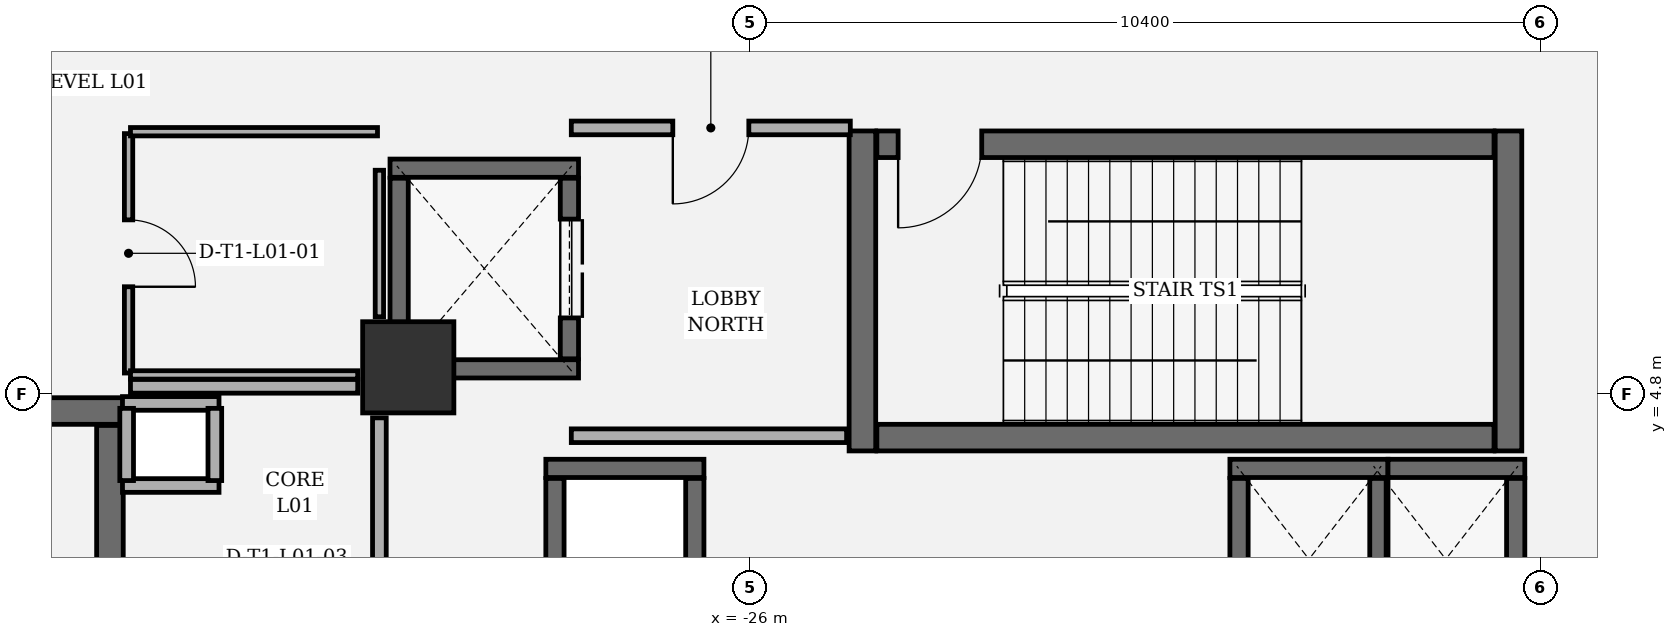
"""IFC4 building model, lengths in metres.
Left out: names, types, materials, properties, quantities, classifications, styles, units other than length and angle.
Written with IfcOpenShell. Run it as: python <this file> out.ifc"""

import sys

from ifc_helpers import new_model, si_unit, direction, frame, frame_2d, origin, origin_2d, place, context, subcontext, project, spatial, rectangle, extrude, element, fill, save


model = new_model("IFC4")
c1 = context("Model", 3, precision=1e-05, world=origin(), true_north=direction((0.0, 1.0)))
c2 = subcontext(c1, "Body", "Model", "MODEL_VIEW")
j1 = project(units=[si_unit("LENGTHUNIT", "METRE"), si_unit("PLANEANGLEUNIT", "RADIAN")], contexts=[c1])
p1 = place(None, origin())
s1 = spatial("IfcSite", under=j1, at=p1, CompositionType="ELEMENT")
p2 = place(p1, origin())
s2 = spatial("IfcBuilding", under=s1, at=p2, CompositionType="ELEMENT")
p3 = place(p2, frame((0.0, 0.0, 6.6)))
s3 = spatial("IfcBuildingStorey", under=s2, at=p3, CompositionType="ELEMENT", Elevation=6.6)
p4 = place(p3, frame((-30.5, 5.15, 0.0), z_axis=(0.0, 0.0, 1.0), x_axis=(1.0, 0.0, 0.0)))
e1 = element("IfcColumn", 1, at=p4, inside=s3, PredefinedType="COLUMN", context=c2, shape_type="SweptSolid", body=[
    extrude(rectangle(XDim=1.2, YDim=1.2, at=origin_2d()), origin(), (0.0, 0.0, 1.0), 5.4),
])
p5 = place(p3, frame((-64.419, 4.637, 0.0), z_axis=(0.0, 0.0, 1.0), x_axis=(0.842602364841, 0.538536214905, 0.0)))
e2 = element("IfcWall", 2, at=p5, inside=s3, PredefinedType="SOLIDWALL", context=c2, shape_type="SweptSolid", body=[
    extrude(rectangle(XDim=60.27, YDim=0.38, at=frame_2d((30.135, 0.0))), origin(), (0.0, 0.0, 1.0), 5.14),
])
p6 = place(p5, frame((29.435, 0.0, 0.8)))
e3 = element("IfcOpeningElement", 3, at=p6, cuts=e2, PredefinedType="OPENING", context=c2, shape_type="SweptSolid", body=[
    extrude(rectangle(XDim=1.4, YDim=1.5, at=frame_2d((0.7, 0.75))), frame((0.0, 0.2, 0.0), z_axis=(0.0, -1.0, 0.0), x_axis=(1.0, 0.0, 0.0)), (0.0, 0.0, 1.0), 0.4),
])
for number, where, z_axis, x_axis in (
    (4, (-24.525, 8.26, 0.0), (0.0, 0.0, 1.0), (0.0, -1.0, 0.0)),
    (5, (-16.025, 4.05, 0.0), (0.0, 0.0, 1.0), (0.0, 1.0, 0.0)),
):
    element("IfcWall", number, at=place(p3, frame(where, z_axis=z_axis, x_axis=x_axis)), inside=s3, PredefinedType="SHEAR", context=c2, shape_type="SweptSolid", body=[
        extrude(rectangle(XDim=4.21, YDim=0.35, at=frame_2d((2.105, 0.0))), origin(), (0.0, 0.0, 1.0), 5.14),
    ])
p7 = place(p3, frame((-24.335, 4.225, 0.0), z_axis=(0.0, 0.0, 1.0), x_axis=(1.0, 0.0, 0.0)))
e6 = element("IfcWall", 6, at=p7, inside=s3, PredefinedType="SHEAR", context=c2, shape_type="SweptSolid", body=[
    extrude(rectangle(XDim=8.12, YDim=0.35, at=frame_2d((4.06, 0.0))), origin(), (0.0, 0.0, 1.0), 5.14),
])
p8 = place(p3, frame((-16.215, 8.085, 0.0), z_axis=(0.0, 0.0, 1.0), x_axis=(-1.0, 0.0, 0.0)))
e7 = element("IfcWall", 7, at=p8, inside=s3, PredefinedType="SHEAR", context=c2, shape_type="SweptSolid", body=[
    extrude(rectangle(XDim=8.12, YDim=0.35, at=frame_2d((4.06, 0.0))), origin(), (0.0, 0.0, 1.0), 5.14),
])
p9 = place(p8, frame((6.74, 0.0, 0.0)))
e8 = element("IfcOpeningElement", 8, at=p9, cuts=e7, PredefinedType="OPENING", context=c2, shape_type="SweptSolid", body=[
    extrude(rectangle(XDim=1.1, YDim=2.2, at=frame_2d((0.55, 1.1))), frame((0.0, 0.185, 0.0), z_axis=(0.0, -1.0, 0.0), x_axis=(1.0, 0.0, 0.0)), (0.0, 0.0, 1.0), 0.37),
])
p10 = place(p3, frame((-34.25, 4.575, 0.0), z_axis=(0.0, 0.0, 1.0), x_axis=(-1.0, 0.0, 0.0)))
e9 = element("IfcWall", 9, at=p10, inside=s3, PredefinedType="SHEAR", context=c2, shape_type="SweptSolid", body=[
    extrude(rectangle(XDim=4.21, YDim=0.35, at=frame_2d((2.105, 0.0))), origin(), (0.0, 0.0, 1.0), 5.14),
])
p11 = place(p3, frame((-34.425, -4.385, 0.0), z_axis=(0.0, 0.0, 1.0), x_axis=(0.0, 1.0, 0.0)))
e10 = element("IfcWall", 10, at=p11, inside=s3, PredefinedType="SHEAR", context=c2, shape_type="SweptSolid", body=[
    extrude(rectangle(XDim=8.77, YDim=0.35, at=frame_2d((4.385, 0.0))), origin(), (0.0, 0.0, 1.0), 5.14),
])
for number, where, z_axis, x_axis in (
    (11, (-28.26, 5.13, 0.0), (0.0, 0.0, 1.0), (-1.0, 0.0, 0.0)),
    (12, (-30.74, 7.77, 0.0), (0.0, 0.0, 1.0), (1.0, 0.0, 0.0)),
):
    element("IfcWall", number, at=place(p3, frame(where, z_axis=z_axis, x_axis=x_axis)), inside=s3, PredefinedType="SHEAR", context=c2, shape_type="SweptSolid", body=[
        extrude(rectangle(XDim=2.48, YDim=0.24, at=frame_2d((1.24, 0.0))), origin(), (0.0, 0.0, 1.0), 5.14),
    ])
p12 = place(p3, frame((-30.62, 5.262, 0.0), z_axis=(0.0, 0.0, 1.0), x_axis=(0.0, 1.0, 0.0)))
e13 = element("IfcWall", 13, at=p12, inside=s3, PredefinedType="SHEAR", context=c2, shape_type="SweptSolid", body=[
    extrude(rectangle(XDim=2.376, YDim=0.24, at=frame_2d((1.188, 0.0))), origin(), (0.0, 0.0, 1.0), 5.14),
])
p13 = place(p3, frame((-28.38, 7.638, 0.0), z_axis=(0.0, 0.0, 1.0), x_axis=(0.0, -1.0, 0.0)))
e14 = element("IfcWall", 14, at=p13, inside=s3, PredefinedType="SHEAR", context=c2, shape_type="SweptSolid", body=[
    extrude(rectangle(XDim=2.376, YDim=0.24, at=frame_2d((1.188, 0.0))), origin(), (0.0, 0.0, 1.0), 5.14),
])
p14 = place(p13, frame((0.538, 0.0, 0.0)))
e15 = element("IfcOpeningElement", 15, at=p14, cuts=e14, PredefinedType="OPENING", context=c2, shape_type="SweptSolid", body=[
    extrude(rectangle(XDim=1.3, YDim=2.3, at=frame_2d((0.65, 1.15))), frame((0.0, 0.13, 0.0), z_axis=(0.0, -1.0, 0.0), x_axis=(1.0, 0.0, 0.0)), (0.0, 0.0, 1.0), 0.26),
])
p15 = place(p3, frame((-28.69, 3.82, 0.0), z_axis=(0.0, 0.0, 1.0), x_axis=(1.0, 0.0, 0.0)))
e16 = element("IfcWall", 16, at=p15, inside=s3, PredefinedType="SHEAR", context=c2, shape_type="SweptSolid", body=[
    extrude(rectangle(XDim=2.08, YDim=0.24, at=frame_2d((1.04, 0.0))), origin(), (0.0, 0.0, 1.0), 5.14),
])
for number, where, z_axis, x_axis in (
    (17, (-28.57, 1.562, 0.0), (0.0, 0.0, 1.0), (0.0, 1.0, 0.0)),
    (18, (-26.73, 3.688, 0.0), (0.0, 0.0, 1.0), (0.0, -1.0, 0.0)),
):
    element("IfcWall", number, at=place(p3, frame(where, z_axis=z_axis, x_axis=x_axis)), inside=s3, PredefinedType="SHEAR", context=c2, shape_type="SweptSolid", body=[
        extrude(rectangle(XDim=2.126, YDim=0.24, at=frame_2d((1.063, 0.0))), origin(), (0.0, 0.0, 1.0), 5.14),
    ])
p16 = place(p3, frame((-19.69, 3.82, 0.0), z_axis=(0.0, 0.0, 1.0), x_axis=(1.0, 0.0, 0.0)))
e19 = element("IfcWall", 19, at=p16, inside=s3, PredefinedType="SHEAR", context=c2, shape_type="SweptSolid", body=[
    extrude(rectangle(XDim=2.08, YDim=0.24, at=frame_2d((1.04, 0.0))), origin(), (0.0, 0.0, 1.0), 5.14),
])
for number, where, z_axis, x_axis in (
    (20, (-19.57, 1.562, 0.0), (0.0, 0.0, 1.0), (0.0, 1.0, 0.0)),
    (21, (-17.73, 3.688, 0.0), (0.0, 0.0, 1.0), (0.0, -1.0, 0.0)),
):
    element("IfcWall", number, at=place(p3, frame(where, z_axis=z_axis, x_axis=x_axis)), inside=s3, PredefinedType="SHEAR", context=c2, shape_type="SweptSolid", body=[
        extrude(rectangle(XDim=2.126, YDim=0.24, at=frame_2d((1.063, 0.0))), origin(), (0.0, 0.0, 1.0), 5.14),
    ])
p17 = place(p3, frame((-17.61, 3.82, 0.0), z_axis=(0.0, 0.0, 1.0), x_axis=(1.0, 0.0, 0.0)))
e22 = element("IfcWall", 22, at=p17, inside=s3, PredefinedType="SHEAR", context=c2, shape_type="SweptSolid", body=[
    extrude(rectangle(XDim=1.8, YDim=0.24, at=frame_2d((0.9, 0.0))), origin(), (0.0, 0.0, 1.0), 5.14),
])
p18 = place(p3, frame((-15.93, 3.688, 0.0), z_axis=(0.0, 0.0, 1.0), x_axis=(0.0, -1.0, 0.0)))
e23 = element("IfcWall", 23, at=p18, inside=s3, PredefinedType="SHEAR", context=c2, shape_type="SweptSolid", body=[
    extrude(rectangle(XDim=2.126, YDim=0.24, at=frame_2d((1.063, 0.0))), origin(), (0.0, 0.0, 1.0), 5.14),
])
for number, where, z_axis, x_axis in (
    (24, (-32.99, 3.595, 0.0), (0.0, 0.0, 1.0), (-1.0, 0.0, 0.0)),
    (25, (-34.26, 4.675, 0.0), (0.0, 0.0, 1.0), (1.0, 0.0, 0.0)),
):
    element("IfcWall", number, at=place(p3, frame(where, z_axis=z_axis, x_axis=x_axis)), inside=s3, PredefinedType="PARTITIONING", context=c2, shape_type="SweptSolid", body=[
        extrude(rectangle(XDim=1.27, YDim=0.18, at=frame_2d((0.635, 0.0))), origin(), (0.0, 0.0, 1.0), 5.14),
    ])
for number, where, z_axis, x_axis in (
    (26, (-34.205, 3.66, 0.0), (0.0, 0.0, 1.0), (0.0, 1.0, 0.0)),
    (27, (-33.045, 4.61, 0.0), (0.0, 0.0, 1.0), (0.0, -1.0, 0.0)),
):
    element("IfcWall", number, at=place(p3, frame(where, z_axis=z_axis, x_axis=x_axis)), inside=s3, PredefinedType="PARTITIONING", context=c2, shape_type="SweptSolid", body=[
        extrude(rectangle(XDim=0.95, YDim=0.18, at=frame_2d((0.475, 0.0))), origin(), (0.0, 0.0, 1.0), 5.14),
    ])
p19 = place(p3, frame((-28.355, 4.25, 0.0), z_axis=(0.0, 0.0, 1.0), x_axis=(1.0, 0.0, 0.0)))
e28 = element("IfcWall", 28, at=p19, inside=s3, PredefinedType="PARTITIONING", context=c2, shape_type="SweptSolid", body=[
    extrude(rectangle(XDim=3.622, YDim=0.18, at=frame_2d((1.811, 0.0))), origin(), (0.0, 0.0, 1.0), 5.14),
])
p20 = place(p3, frame((-24.684, 8.3, 0.0), z_axis=(0.0, 0.0, 1.0), x_axis=(-1.0, 0.0, 0.0)))
e29 = element("IfcWall", 29, at=p20, inside=s3, PredefinedType="PARTITIONING", context=c2, shape_type="SweptSolid", body=[
    extrude(rectangle(XDim=3.671, YDim=0.18, at=frame_2d((1.835, 0.0))), origin(), (0.0, 0.0, 1.0), 4.653),
])
p21 = place(p20, frame((1.335, 0.0, 0.0)))
e30 = element("IfcOpeningElement", 30, at=p21, cuts=e29, PredefinedType="OPENING", context=c2, shape_type="SweptSolid", body=[
    extrude(rectangle(XDim=1.0, YDim=2.15, at=frame_2d((0.5, 1.075))), frame((0.0, 0.1, 0.0), z_axis=(0.0, -1.0, 0.0), x_axis=(1.0, 0.0, 0.0)), (0.0, 0.0, 1.0), 0.2),
])
p22 = place(p3, frame((-34.18, 8.225, 0.0), z_axis=(0.0, 0.0, 1.0), x_axis=(0.0, -1.0, 0.0)))
e31 = element("IfcWall", 31, at=p22, inside=s3, PredefinedType="PARTITIONING", context=c2, shape_type="SweptSolid", body=[
    extrude(rectangle(XDim=3.15, YDim=0.11, at=frame_2d((1.575, 0.0))), origin(), (0.0, 0.0, 1.0), 5.14),
])
p23 = place(p22, frame((1.135, 0.0, 0.0)))
e32 = element("IfcOpeningElement", 32, at=p23, cuts=e31, PredefinedType="OPENING", context=c2, shape_type="SweptSolid", body=[
    extrude(rectangle(XDim=0.88, YDim=2.1, at=frame_2d((0.44, 1.05))), frame((0.0, 0.065, 0.0), z_axis=(0.0, -1.0, 0.0), x_axis=(1.0, 0.0, 0.0)), (0.0, 0.0, 1.0), 0.13),
])
p24 = place(p3, frame((-34.155, 5.05, 0.0), z_axis=(0.0, 0.0, 1.0), x_axis=(1.0, 0.0, 0.0)))
e33 = element("IfcWall", 33, at=p24, inside=s3, PredefinedType="PARTITIONING", context=c2, shape_type="SweptSolid", body=[
    extrude(rectangle(XDim=2.99, YDim=0.11, at=frame_2d((1.495, 0.0))), origin(), (0.0, 0.0, 1.0), 5.14),
])
p25 = place(p3, frame((-30.88, 5.815, 0.0), z_axis=(0.0, 0.0, 1.0), x_axis=(0.0, 1.0, 0.0)))
e34 = element("IfcWall", 34, at=p25, inside=s3, PredefinedType="PARTITIONING", context=c2, shape_type="SweptSolid", body=[
    extrude(rectangle(XDim=1.928, YDim=0.11, at=frame_2d((0.964, 0.0))), origin(), (0.0, 0.0, 1.0), 5.14),
])
p26 = place(p3, frame((-30.905, 8.25, 0.0), z_axis=(0.0, 0.0, 1.0), x_axis=(-1.0, 0.0, 0.0)))
e35 = element("IfcWall", 35, at=p26, inside=s3, PredefinedType="PARTITIONING", context=c2, shape_type="SweptSolid", body=[
    extrude(rectangle(XDim=3.25, YDim=0.11, at=frame_2d((1.625, 0.0))), origin(), (0.0, 0.0, 1.0), 4.653),
])
p27 = place(p3, frame((-30.88, 1.625, 0.0), z_axis=(0.0, 0.0, 1.0), x_axis=(0.0, 1.0, 0.0)))
e36 = element("IfcWall", 36, at=p27, inside=s3, PredefinedType="PARTITIONING", context=c2, shape_type="SweptSolid", body=[
    extrude(rectangle(XDim=2.86, YDim=0.18, at=frame_2d((1.43, 0.0))), origin(), (0.0, 0.0, 1.0), 5.14),
])
p28 = place(p3, frame((-31.165, 4.9, 0.0), z_axis=(0.0, 0.0, 1.0), x_axis=(-1.0, 0.0, 0.0)))
e37 = element("IfcWall", 37, at=p28, inside=s3, PredefinedType="PARTITIONING", context=c2, shape_type="SweptSolid", body=[
    extrude(rectangle(XDim=2.99, YDim=0.18, at=frame_2d((1.495, 0.0))), origin(), (0.0, 0.0, 1.0), 5.14),
])
p29 = place(p9, origin())
e38 = element("IfcDoor", 38, at=p29, inside=s3, OperationType="SINGLE_SWING_RIGHT", PredefinedType="DOOR", context=c2, shape_type="SweptSolid", body=[
    extrude(rectangle(XDim=1.1, YDim=2.2, at=frame_2d((0.55, 1.1))), frame((0.0, 0.025, 0.0), z_axis=(0.0, -1.0, 0.0), x_axis=(1.0, 0.0, 0.0)), (0.0, 0.0, 1.0), 0.05),
])
fill(e8, e38)
p30 = place(p14, origin())
e39 = element("IfcDoor", 39, at=p30, inside=s3, OperationType="DOUBLE_DOOR_SLIDING", PredefinedType="DOOR", context=c2, shape_type="SweptSolid", body=[
    extrude(rectangle(XDim=1.3, YDim=2.3, at=frame_2d((0.65, 1.15))), frame((0.0, 0.025, 0.0), z_axis=(0.0, -1.0, 0.0), x_axis=(1.0, 0.0, 0.0)), (0.0, 0.0, 1.0), 0.05),
])
fill(e15, e39)
p31 = place(p23, origin())
e40 = element("IfcDoor", 40, at=p31, inside=s3, OperationType="SINGLE_SWING_RIGHT", PredefinedType="DOOR", context=c2, shape_type="SweptSolid", body=[
    extrude(rectangle(XDim=0.88, YDim=2.1, at=frame_2d((0.44, 1.05))), frame((0.0, 0.025, 0.0), z_axis=(0.0, -1.0, 0.0), x_axis=(1.0, 0.0, 0.0)), (0.0, 0.0, 1.0), 0.05),
])
fill(e32, e40)
p32 = place(p21, origin())
e41 = element("IfcDoor", 41, at=p32, inside=s3, OperationType="SINGLE_SWING_RIGHT", PredefinedType="DOOR", context=c2, shape_type="SweptSolid", body=[
    extrude(rectangle(XDim=1.0, YDim=2.15, at=frame_2d((0.5, 1.075))), frame((0.0, 0.025, 0.0), z_axis=(0.0, -1.0, 0.0), x_axis=(1.0, 0.0, 0.0)), (0.0, 0.0, 1.0), 0.05),
])
fill(e30, e41)
save(model, sys.argv[1])
